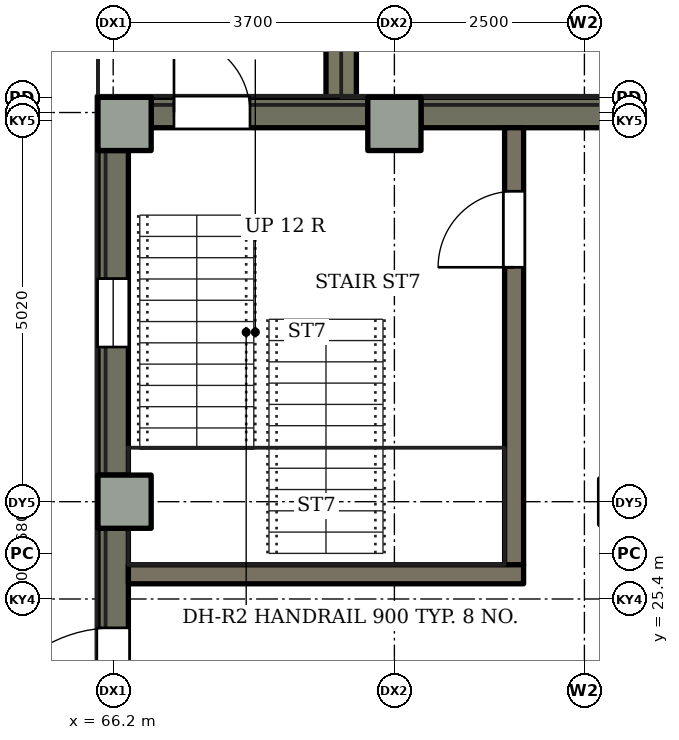
"""IFC4 building model, lengths in metres.
Left out: names, types, materials, properties, quantities, classifications, styles, units other than length and angle.
Written with IfcOpenShell. Run it as: python <this file> out.ifc"""

import sys

from ifc_helpers import new_model, si_unit, direction, frame, frame_2d, origin, origin_2d, place, context, subcontext, project, spatial, rectangle, extrude, element, fill, save


model = new_model("IFC4")
c1 = context("Model", 3, precision=1e-05, world=origin(), true_north=direction((0.0, 1.0)))
c2 = subcontext(c1, "Body", "Model", "MODEL_VIEW")
j1 = project(units=[si_unit("LENGTHUNIT", "METRE"), si_unit("PLANEANGLEUNIT", "RADIAN")], contexts=[c1])
p1 = place(None, origin())
s1 = spatial("IfcSite", under=j1, at=p1, CompositionType="ELEMENT")
p2 = place(p1, origin())
s2 = spatial("IfcBuilding", under=s1, at=p2, CompositionType="ELEMENT")
p3 = place(p2, origin())
s3 = spatial("IfcBuildingStorey", under=s2, at=p3, CompositionType="ELEMENT", Elevation=0.0)
for number, where, z_axis, x_axis in (
    (1, (66.35, 31.65, 0.0), (0.0, 0.0, 1.0), (1.0, 0.0, 0.0)),
    (2, (69.9, 31.65, 0.0), (0.0, 0.0, 1.0), (1.0, 0.0, 0.0)),
    (3, (66.35, 26.68, 0.0), (0.0, 0.0, 1.0), (1.0, 0.0, 0.0)),
):
    element("IfcColumn", number, at=place(p3, frame(where, z_axis=z_axis, x_axis=x_axis)), inside=s3, PredefinedType="COLUMN", context=c2, shape_type="SweptSolid", body=[
        extrude(rectangle(XDim=0.7, YDim=0.7, at=origin_2d()), origin(), (0.0, 0.0, 1.0), 4.2),
    ])
p4 = place(p3, frame((66.7, 31.8, 0.0), z_axis=(0.0, 0.0, 1.0), x_axis=(1.0, 0.0, 0.0)))
e4 = element("IfcWall", 4, at=p4, inside=s3, PredefinedType="SOLIDWALL", context=c2, shape_type="SweptSolid", body=[
    extrude(rectangle(XDim=2.85, YDim=0.4, at=frame_2d((1.425, 0.0))), origin(), (0.0, 0.0, 1.0), 4.2),
])
p5 = place(p4, frame((0.3, 0.0, 0.0)))
e5 = element("IfcOpeningElement", 5, at=p5, cuts=e4, PredefinedType="OPENING", context=c2, shape_type="SweptSolid", body=[
    extrude(rectangle(XDim=1.0, YDim=2.4, at=frame_2d((0.5, 1.2))), frame((0.0, 0.21, 0.0), z_axis=(0.0, -1.0, 0.0), x_axis=(1.0, 0.0, 0.0)), (0.0, 0.0, 1.0), 0.42),
])
p6 = place(p3, frame((70.25, 31.8, 0.0), z_axis=(0.0, 0.0, 1.0), x_axis=(1.0, 0.0, 0.0)))
e6 = element("IfcWall", 6, at=p6, inside=s3, PredefinedType="SOLIDWALL", context=c2, shape_type="SweptSolid", body=[
    extrude(rectangle(XDim=3.0, YDim=0.4, at=frame_2d((1.5, 0.0))), origin(), (0.0, 0.0, 1.0), 4.2),
])
p7 = place(p3, frame((66.2, 21.91, 0.0), z_axis=(0.0, 0.0, 1.0), x_axis=(0.0, 1.0, 0.0)))
e7 = element("IfcWall", 7, at=p7, inside=s3, PredefinedType="SOLIDWALL", context=c2, shape_type="SweptSolid", body=[
    extrude(rectangle(XDim=4.42, YDim=0.4, at=frame_2d((2.21, 0.0))), origin(), (0.0, 0.0, 1.0), 4.2),
])
p8 = place(p7, frame((1.31, 0.0, 0.0)))
e8 = element("IfcOpeningElement", 8, at=p8, cuts=e7, PredefinedType="OPENING", context=c2, shape_type="SweptSolid", body=[
    extrude(rectangle(XDim=1.8, YDim=2.4, at=frame_2d((0.9, 1.2))), frame((0.0, 0.21, 0.0), z_axis=(0.0, -1.0, 0.0), x_axis=(1.0, 0.0, 0.0)), (0.0, 0.0, 1.0), 0.42),
])
p9 = place(p3, frame((66.2, 27.03, 0.0), z_axis=(0.0, 0.0, 1.0), x_axis=(0.0, 1.0, 0.0)))
e9 = element("IfcWall", 9, at=p9, inside=s3, PredefinedType="SOLIDWALL", context=c2, shape_type="SweptSolid", body=[
    extrude(rectangle(XDim=4.27, YDim=0.4, at=frame_2d((2.135, 0.0))), origin(), (0.0, 0.0, 1.0), 4.2),
])
p10 = place(p9, frame((1.685, 0.0, 0.9)))
e10 = element("IfcOpeningElement", 10, at=p10, cuts=e9, PredefinedType="OPENING", context=c2, shape_type="SweptSolid", body=[
    extrude(rectangle(XDim=0.9, YDim=1.8, at=frame_2d((0.45, 0.9))), frame((0.0, 0.21, 0.0), z_axis=(0.0, -1.0, 0.0), x_axis=(1.0, 0.0, 0.0)), (0.0, 0.0, 1.0), 0.42),
])
p11 = place(p3, frame((71.475, 25.85, 0.0), z_axis=(0.0, 0.0, 1.0), x_axis=(0.0, 1.0, 0.0)))
e11 = element("IfcWall", 11, at=p11, inside=s3, PredefinedType="SHEAR", context=c2, shape_type="SweptSolid", body=[
    extrude(rectangle(XDim=5.75, YDim=0.25, at=frame_2d((2.875, 0.0))), origin(), (0.0, 0.0, 1.0), 4.2),
])
p12 = place(p11, frame((3.914, 0.0, 0.0)))
e12 = element("IfcOpeningElement", 12, at=p12, cuts=e11, PredefinedType="OPENING", context=c2, shape_type="SweptSolid", body=[
    extrude(rectangle(XDim=1.0, YDim=2.1, at=frame_2d((0.5, 1.05))), frame((0.0, 0.135, 0.0), z_axis=(0.0, -1.0, 0.0), x_axis=(1.0, 0.0, 0.0)), (0.0, 0.0, 1.0), 0.27),
])
p13 = place(p3, frame((66.4, 25.725, 0.0), z_axis=(0.0, 0.0, 1.0), x_axis=(1.0, 0.0, 0.0)))
e13 = element("IfcWall", 13, at=p13, inside=s3, PredefinedType="SHEAR", context=c2, shape_type="SweptSolid", body=[
    extrude(rectangle(XDim=5.2, YDim=0.25, at=frame_2d((2.6, 0.0))), origin(), (0.0, 0.0, 1.0), 4.2),
])
p14 = place(p3, frame((72.9, 26.68, 0.0), z_axis=(0.0, 0.0, 1.0), x_axis=(1.0, 0.0, 0.0)))
e14 = element("IfcColumn", 14, at=p14, inside=s3, PredefinedType="COLUMN", context=c2, shape_type="SweptSolid", body=[
    extrude(rectangle(XDim=0.6, YDim=0.6, at=origin_2d()), origin(), (0.0, 0.0, 1.0), 4.2),
])
p15 = place(p3, frame((69.2, 34.3, 0.0), z_axis=(0.0, 0.0, 1.0), x_axis=(0.0, -1.0, 0.0)))
e15 = element("IfcWall", 15, at=p15, inside=s3, PredefinedType="STANDARD", context=c2, shape_type="SweptSolid", body=[
    extrude(rectangle(XDim=2.3, YDim=0.4, at=frame_2d((1.15, 0.0))), origin(), (0.0, 0.0, 1.0), 4.2),
])
for number, where, z_axis, x_axis in (
    (16, (66.4, 26.95, 0.0), (0.0, 0.0, 1.0), (0.0, -1.0, 0.0)),
    (17, (70.17, 31.6, 0.0), (0.0, 0.0, 1.0), (-1.0, 0.0, 0.0)),
):
    element("IfcWall", number, at=place(p3, frame(where, z_axis=z_axis, x_axis=x_axis)), inside=s3, PredefinedType="PARTITIONING", context=c2, shape_type="SweptSolid", body=[
        extrude(rectangle(XDim=0.54, YDim=0.21, at=frame_2d((0.27, 0.0))), origin(), (0.0, 0.0, 1.0), 3.98),
    ])
p16 = place(p5, origin())
e18 = element("IfcDoor", 18, at=p16, inside=s3, OperationType="SINGLE_SWING_LEFT", PredefinedType="DOOR", context=c2, shape_type="SweptSolid", body=[
    extrude(rectangle(XDim=1.0, YDim=2.4, at=frame_2d((0.5, 1.2))), frame((0.0, 0.025, 0.0), z_axis=(0.0, -1.0, 0.0), x_axis=(1.0, 0.0, 0.0)), (0.0, 0.0, 1.0), 0.05),
])
fill(e5, e18)
p17 = place(p8, origin())
e19 = element("IfcDoor", 19, at=p17, inside=s3, OperationType="DOUBLE_DOOR_SINGLE_SWING", PredefinedType="DOOR", context=c2, shape_type="SweptSolid", body=[
    extrude(rectangle(XDim=1.8, YDim=2.4, at=frame_2d((0.9, 1.2))), frame((0.0, 0.025, 0.0), z_axis=(0.0, -1.0, 0.0), x_axis=(1.0, 0.0, 0.0)), (0.0, 0.0, 1.0), 0.05),
])
fill(e8, e19)
p18 = place(p10, origin())
e20 = element("IfcWindow", 20, at=p18, inside=s3, PartitioningType="SINGLE_PANEL", PredefinedType="WINDOW", context=c2, shape_type="SweptSolid", body=[
    extrude(rectangle(XDim=0.9, YDim=1.8, at=frame_2d((0.45, 0.9))), frame((0.0, 0.03, 0.0), z_axis=(0.0, -1.0, 0.0), x_axis=(1.0, 0.0, 0.0)), (0.0, 0.0, 1.0), 0.06),
])
fill(e10, e20)
p19 = place(p12, origin())
e21 = element("IfcDoor", 21, at=p19, inside=s3, OperationType="SINGLE_SWING_LEFT", PredefinedType="DOOR", context=c2, shape_type="SweptSolid", body=[
    extrude(rectangle(XDim=1.0, YDim=2.1, at=frame_2d((0.5, 1.05))), frame((0.0, 0.025, 0.0), z_axis=(0.0, -1.0, 0.0), x_axis=(1.0, 0.0, 0.0)), (0.0, 0.0, 1.0), 0.05),
])
fill(e12, e21)
save(model, sys.argv[1])
